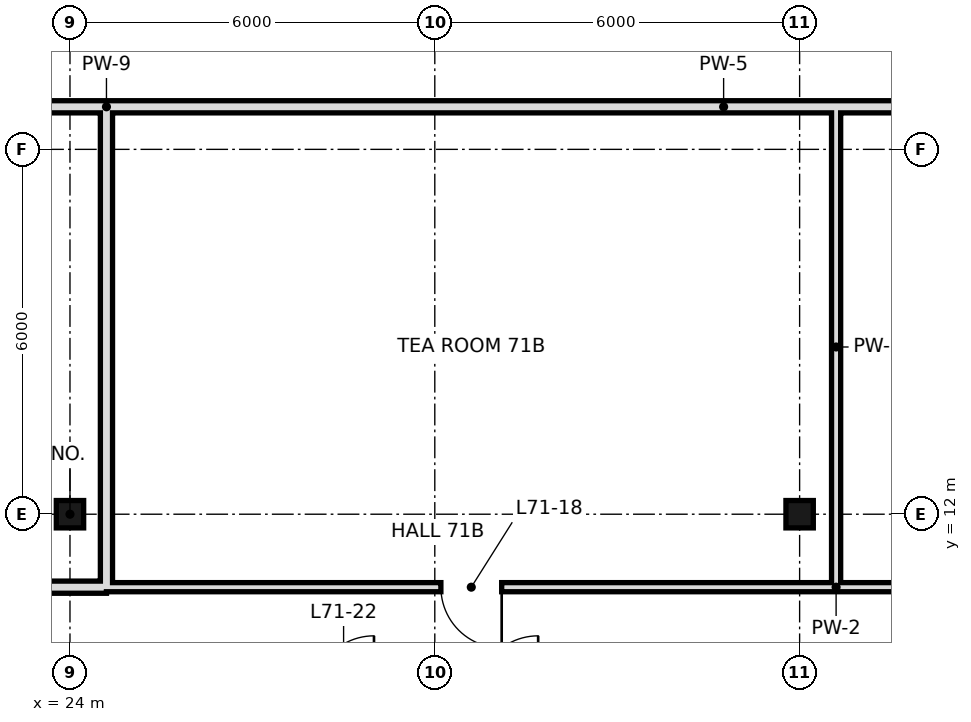
"""IFC4 building model, lengths in metres.
Left out: names, types, materials, properties, quantities, classifications, styles, units other than length and angle.
Written with IfcOpenShell. Run it as: python <this file> out.ifc"""

import sys

from ifc_helpers import new_model, si_unit, direction, frame, frame_2d, origin, origin_2d, place, context, subcontext, project, spatial, rectangle, hollow_rectangle, extrude, element, fill, save


model = new_model("IFC4")
c1 = context("Model", 3, precision=1e-05, world=origin(), true_north=direction((0.0, 1.0)))
c2 = subcontext(c1, "Body", "Model", "MODEL_VIEW")
j1 = project(units=[si_unit("LENGTHUNIT", "METRE"), si_unit("PLANEANGLEUNIT", "RADIAN")], contexts=[c1])
p1 = place(None, origin())
s1 = spatial("IfcSite", under=j1, at=p1, CompositionType="ELEMENT")
p2 = place(p1, origin())
s2 = spatial("IfcBuilding", under=s1, at=p2, CompositionType="ELEMENT")
p3 = place(p2, frame((0.0, 0.0, 301.6)))
s3 = spatial("IfcBuildingStorey", under=s2, at=p3, CompositionType="ELEMENT", Elevation=301.6)
for number, where, z_axis, x_axis in (
    (1, (24.0, 12.0, 0.0), (0.0, 0.0, 1.0), (1.0, 0.0, 0.0)),
    (2, (36.0, 12.0, 0.0), (0.0, 0.0, 1.0), (1.0, 0.0, 0.0)),
):
    element("IfcColumn", number, at=place(p3, frame(where, z_axis=z_axis, x_axis=x_axis)), inside=s3, PredefinedType="COLUMN", context=c2, shape_type="SweptSolid", body=[
        extrude(hollow_rectangle(XDim=0.45, YDim=0.45, WallThickness=0.022, at=origin_2d()), origin(), (0.0, 0.0, 1.0), 3.6),
    ])
p4 = place(p3, frame((24.6, 10.8, 0.0), z_axis=(0.0, 0.0, 1.0), x_axis=(0.0, 1.0, 0.0)))
e3 = element("IfcWall", 3, at=p4, inside=s3, PredefinedType="SOLIDWALL", context=c2, shape_type="SweptSolid", body=[
    extrude(rectangle(XDim=7.9, YDim=0.2, at=frame_2d((3.95, 0.0))), origin(), (0.0, 0.0, 1.0), 2.72),
])
p5 = place(p3, frame((36.6, 10.8, 0.0), z_axis=(0.0, 0.0, 1.0), x_axis=(0.0, 1.0, 0.0)))
e4 = element("IfcWall", 4, at=p5, inside=s3, PredefinedType="PARTITIONING", context=c2, shape_type="SweptSolid", body=[
    extrude(rectangle(XDim=7.9, YDim=0.15, at=frame_2d((3.95, 0.0))), origin(), (0.0, 0.0, 1.0), 3.42),
])
p6 = place(p3, frame((20.4, 10.8, 0.0), z_axis=(0.0, 0.0, 1.0), x_axis=(1.0, 0.0, 0.0)))
e5 = element("IfcWall", 5, at=p6, inside=s3, PredefinedType="SOLIDWALL", context=c2, shape_type="SweptSolid", body=[
    extrude(rectangle(XDim=4.2, YDim=0.2, at=frame_2d((2.1, 0.0))), origin(), (0.0, 0.0, 1.0), 2.72),
])
p7 = place(p6, frame((2.14, 0.0, 0.0)))
e6 = element("IfcOpeningElement", 6, at=p7, cuts=e5, PredefinedType="OPENING", context=c2, shape_type="SweptSolid", body=[
    extrude(rectangle(XDim=1.0, YDim=2.4, at=frame_2d((0.5, 1.2))), frame((0.0, 0.11, 0.0), z_axis=(0.0, -1.0, 0.0), x_axis=(1.0, 0.0, 0.0)), (0.0, 0.0, 1.0), 0.22),
])
p8 = place(p3, frame((24.6, 10.8, 0.0), z_axis=(0.0, 0.0, 1.0), x_axis=(1.0, 0.0, 0.0)))
e7 = element("IfcWall", 7, at=p8, inside=s3, PredefinedType="PARTITIONING", context=c2, shape_type="SweptSolid", body=[
    extrude(rectangle(XDim=24.0, YDim=0.15, at=frame_2d((12.0, 0.0))), origin(), (0.0, 0.0, 1.0), 3.42),
])
p9 = place(p8, frame((5.5, 0.0, 0.0)))
e8 = element("IfcOpeningElement", 8, at=p9, cuts=e7, PredefinedType="OPENING", context=c2, shape_type="SweptSolid", body=[
    extrude(rectangle(XDim=1.0, YDim=2.4, at=frame_2d((0.5, 1.2))), frame((0.0, 0.085, 0.0), z_axis=(0.0, -1.0, 0.0), x_axis=(1.0, 0.0, 0.0)), (0.0, 0.0, 1.0), 0.17),
])
p10 = place(p8, frame((15.22, 0.0, 0.0)))
e9 = element("IfcOpeningElement", 9, at=p10, cuts=e7, PredefinedType="OPENING", context=c2, shape_type="SweptSolid", body=[
    extrude(rectangle(XDim=1.0, YDim=2.4, at=frame_2d((0.5, 1.2))), frame((0.0, 0.085, 0.0), z_axis=(0.0, -1.0, 0.0), x_axis=(1.0, 0.0, 0.0)), (0.0, 0.0, 1.0), 0.17),
])
p11 = place(p3, frame((24.6, 18.7, 0.0), z_axis=(0.0, 0.0, 1.0), x_axis=(1.0, 0.0, 0.0)))
e10 = element("IfcWall", 10, at=p11, inside=s3, PredefinedType="SOLIDWALL", context=c2, shape_type="SweptSolid", body=[
    extrude(rectangle(XDim=20.3, YDim=0.2, at=frame_2d((10.15, 0.0))), origin(), (0.0, 0.0, 1.0), 2.72),
])
p12 = place(p3, frame((20.4, 18.7, 0.0), z_axis=(0.0, 0.0, 1.0), x_axis=(1.0, 0.0, 0.0)))
e11 = element("IfcWall", 11, at=p12, inside=s3, PredefinedType="SOLIDWALL", context=c2, shape_type="SweptSolid", body=[
    extrude(rectangle(XDim=4.2, YDim=0.2, at=frame_2d((2.1, 0.0))), origin(), (0.0, 0.0, 1.0), 3.42),
])
p13 = place(p9, origin())
e12 = element("IfcDoor", 12, at=p13, inside=s3, OperationType="SINGLE_SWING_RIGHT", PredefinedType="DOOR", context=c2, shape_type="SweptSolid", body=[
    extrude(rectangle(XDim=1.0, YDim=2.4, at=frame_2d((0.5, 1.2))), frame((0.0, 0.025, 0.0), z_axis=(0.0, -1.0, 0.0), x_axis=(1.0, 0.0, 0.0)), (0.0, 0.0, 1.0), 0.05),
])
fill(e8, e12)
save(model, sys.argv[1])
